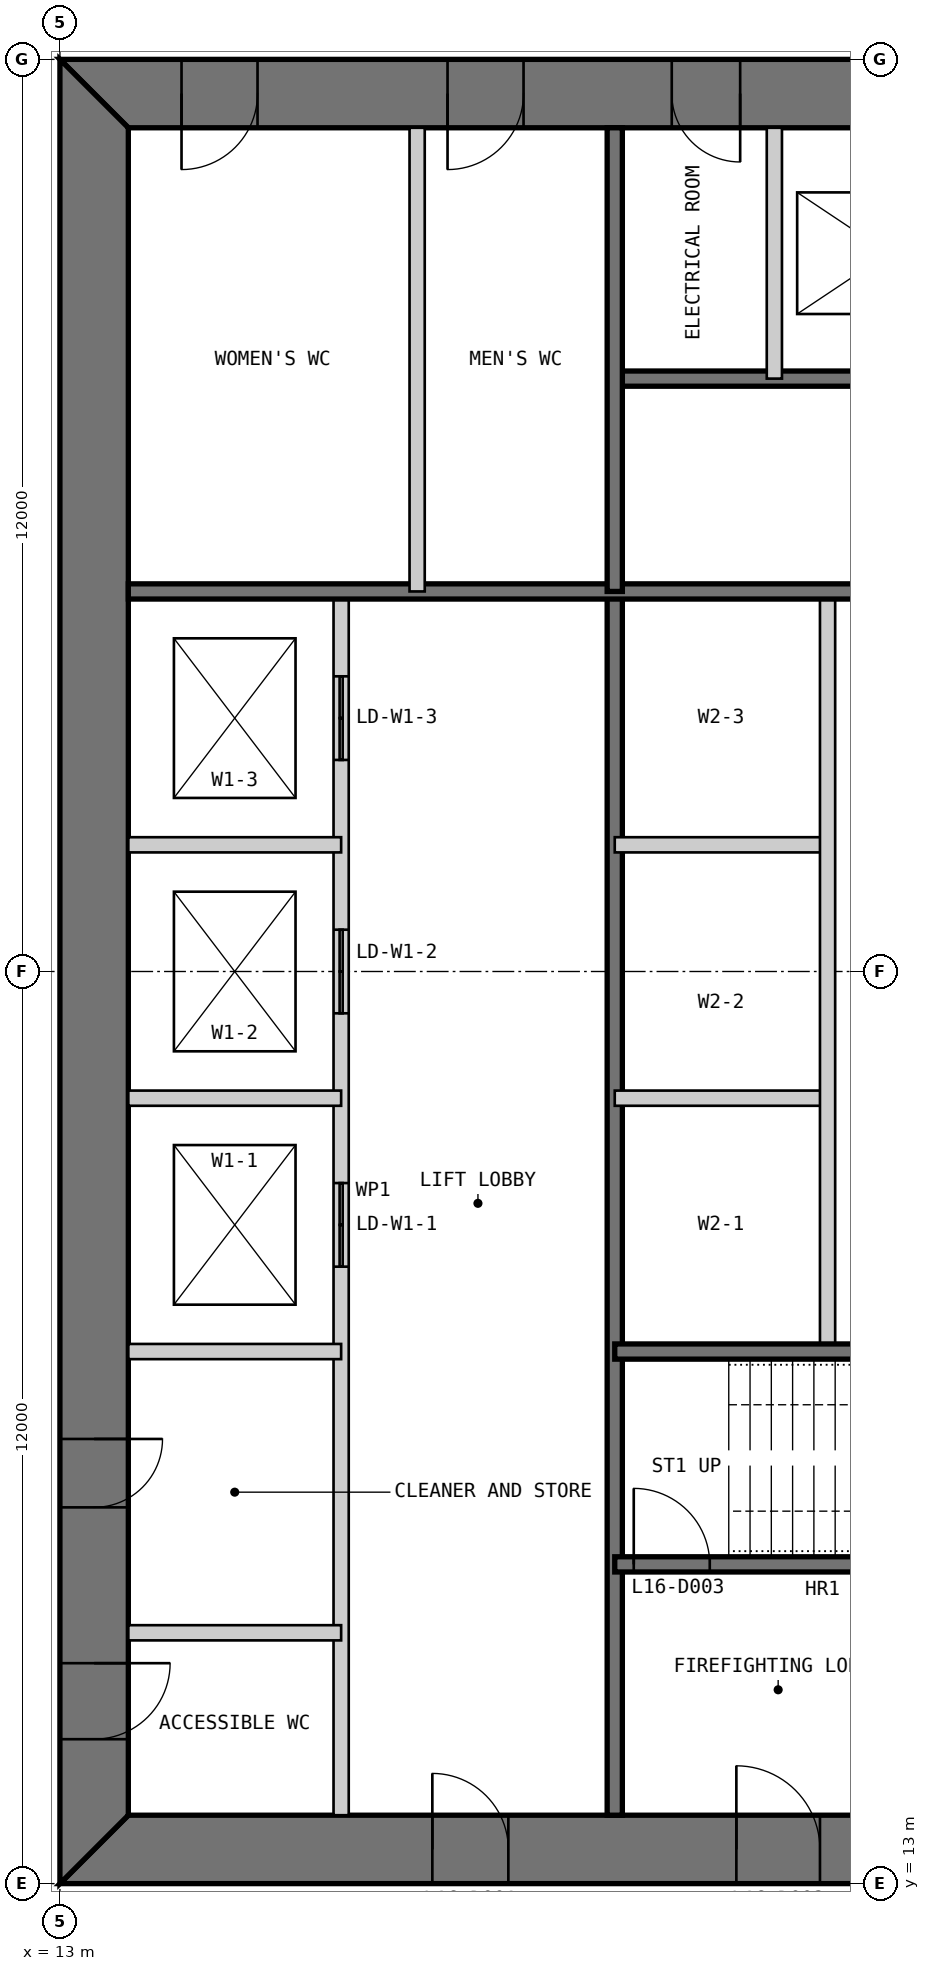
"""IFC4 building model, lengths in metres.
Left out: names, types, materials, properties, quantities, classifications, styles, units other than length and angle.
Written with IfcOpenShell. Run it as: python <this file> out.ifc"""

import sys

from ifc_helpers import new_model, si_unit, direction, frame, frame_2d, origin, place, context, subcontext, project, spatial, polyline, rectangle, outline, extrude, element, fill, save


model = new_model("IFC4")
c1 = context("Model", 3, precision=1e-05, world=origin(), true_north=direction((0.0, 1.0)))
c2 = subcontext(c1, "Body", "Model", "MODEL_VIEW")
j1 = project(units=[si_unit("LENGTHUNIT", "METRE"), si_unit("PLANEANGLEUNIT", "RADIAN")], contexts=[c1])
p1 = place(None, origin())
s1 = spatial("IfcSite", under=j1, at=p1, CompositionType="ELEMENT")
p2 = place(p1, origin())
s2 = spatial("IfcBuilding", under=s1, at=p2, CompositionType="ELEMENT")
p3 = place(p2, frame((0.0, 0.0, 71.0)))
s3 = spatial("IfcBuildingStorey", under=s2, at=p3, CompositionType="ELEMENT", Elevation=71.0)
p4 = place(p3, frame((13.0, 13.45, 0.0), z_axis=(0.0, 0.0, 1.0), x_axis=(1.0, 0.0, 0.0)))
e1 = element("IfcWall", 1, at=p4, inside=s3, PredefinedType="SHEAR", context=c2, shape_type="SweptSolid", body=[
    extrude(outline(polyline([(0.0, -0.45), (24.0, -0.45), (23.1, 0.45), (0.9, 0.45), (0.0, -0.45)])), origin(), (0.0, 0.0, 1.0), 4.0),
])
p5 = place(p4, frame((4.9, 0.0, 0.0)))
e2 = element("IfcOpeningElement", 2, at=p5, cuts=e1, PredefinedType="OPENING", context=c2, shape_type="SweptSolid", body=[
    extrude(rectangle(XDim=1.0, YDim=2.2, at=frame_2d((0.5, 1.1))), frame((0.0, 0.46, 0.0), z_axis=(0.0, -1.0, 0.0), x_axis=(1.0, 0.0, 0.0)), (0.0, 0.0, 1.0), 0.92),
])
p6 = place(p4, frame((8.9, 0.0, 0.0)))
e3 = element("IfcOpeningElement", 3, at=p6, cuts=e1, PredefinedType="OPENING", context=c2, shape_type="SweptSolid", body=[
    extrude(rectangle(XDim=1.1, YDim=2.2, at=frame_2d((0.55, 1.1))), frame((0.0, 0.46, 0.0), z_axis=(0.0, -1.0, 0.0), x_axis=(1.0, 0.0, 0.0)), (0.0, 0.0, 1.0), 0.92),
])
p7 = place(p4, frame((15.05, 0.0, 0.0)))
e4 = element("IfcOpeningElement", 4, at=p7, cuts=e1, PredefinedType="OPENING", context=c2, shape_type="SweptSolid", body=[
    extrude(rectangle(XDim=0.9, YDim=2.2, at=frame_2d((0.45, 1.1))), frame((0.0, 0.46, 0.0), z_axis=(0.0, -1.0, 0.0), x_axis=(1.0, 0.0, 0.0)), (0.0, 0.0, 1.0), 0.92),
])
p8 = place(p4, frame((17.9, 0.0, 0.0)))
e5 = element("IfcOpeningElement", 5, at=p8, cuts=e1, PredefinedType="OPENING", context=c2, shape_type="SweptSolid", body=[
    extrude(rectangle(XDim=1.0, YDim=2.2, at=frame_2d((0.5, 1.1))), frame((0.0, 0.46, 0.0), z_axis=(0.0, -1.0, 0.0), x_axis=(1.0, 0.0, 0.0)), (0.0, 0.0, 1.0), 0.92),
])
p9 = place(p4, frame((21.4, 0.0, 0.0)))
e6 = element("IfcOpeningElement", 6, at=p9, cuts=e1, PredefinedType="OPENING", context=c2, shape_type="SweptSolid", body=[
    extrude(rectangle(XDim=1.0, YDim=2.2, at=frame_2d((0.5, 1.1))), frame((0.0, 0.46, 0.0), z_axis=(0.0, -1.0, 0.0), x_axis=(1.0, 0.0, 0.0)), (0.0, 0.0, 1.0), 0.92),
])
p10 = place(p3, frame((37.0, 36.55, 0.0), z_axis=(0.0, 0.0, 1.0), x_axis=(-1.0, 0.0, 0.0)))
e7 = element("IfcWall", 7, at=p10, inside=s3, PredefinedType="SHEAR", context=c2, shape_type="SweptSolid", body=[
    extrude(outline(polyline([(0.0, -0.45), (24.0, -0.45), (23.1, 0.45), (0.9, 0.45), (0.0, -0.45)])), origin(), (0.0, 0.0, 1.0), 4.0),
])
p11 = place(p10, frame((4.9, 0.0, 0.0)))
e8 = element("IfcOpeningElement", 8, at=p11, cuts=e7, PredefinedType="OPENING", context=c2, shape_type="SweptSolid", body=[
    extrude(rectangle(XDim=1.0, YDim=2.2, at=frame_2d((0.5, 1.1))), frame((0.0, 0.46, 0.0), z_axis=(0.0, -1.0, 0.0), x_axis=(1.0, 0.0, 0.0)), (0.0, 0.0, 1.0), 0.92),
])
p12 = place(p10, frame((8.9, 0.0, 0.0)))
e9 = element("IfcOpeningElement", 9, at=p12, cuts=e7, PredefinedType="OPENING", context=c2, shape_type="SweptSolid", body=[
    extrude(rectangle(XDim=1.1, YDim=2.2, at=frame_2d((0.55, 1.1))), frame((0.0, 0.46, 0.0), z_axis=(0.0, -1.0, 0.0), x_axis=(1.0, 0.0, 0.0)), (0.0, 0.0, 1.0), 0.92),
])
p13 = place(p10, frame((15.05, 0.0, 0.0)))
e10 = element("IfcOpeningElement", 10, at=p13, cuts=e7, PredefinedType="OPENING", context=c2, shape_type="SweptSolid", body=[
    extrude(rectangle(XDim=0.9, YDim=2.2, at=frame_2d((0.45, 1.1))), frame((0.0, 0.46, 0.0), z_axis=(0.0, -1.0, 0.0), x_axis=(1.0, 0.0, 0.0)), (0.0, 0.0, 1.0), 0.92),
])
p14 = place(p10, frame((17.9, 0.0, 0.0)))
e11 = element("IfcOpeningElement", 11, at=p14, cuts=e7, PredefinedType="OPENING", context=c2, shape_type="SweptSolid", body=[
    extrude(rectangle(XDim=1.0, YDim=2.2, at=frame_2d((0.5, 1.1))), frame((0.0, 0.46, 0.0), z_axis=(0.0, -1.0, 0.0), x_axis=(1.0, 0.0, 0.0)), (0.0, 0.0, 1.0), 0.92),
])
p15 = place(p10, frame((21.4, 0.0, 0.0)))
e12 = element("IfcOpeningElement", 12, at=p15, cuts=e7, PredefinedType="OPENING", context=c2, shape_type="SweptSolid", body=[
    extrude(rectangle(XDim=1.0, YDim=2.2, at=frame_2d((0.5, 1.1))), frame((0.0, 0.46, 0.0), z_axis=(0.0, -1.0, 0.0), x_axis=(1.0, 0.0, 0.0)), (0.0, 0.0, 1.0), 0.92),
])
p16 = place(p3, frame((13.45, 36.1, 0.0), z_axis=(0.0, 0.0, 1.0), x_axis=(0.0, -1.0, 0.0)))
e13 = element("IfcWall", 13, at=p16, inside=s3, PredefinedType="SHEAR", context=c2, shape_type="SweptSolid", body=[
    extrude(outline(polyline([(-0.9, -0.45), (23.1, -0.45), (22.2, 0.45), (0.0, 0.45), (-0.9, -0.45)])), origin(), (0.0, 0.0, 1.0), 4.0),
])
p17 = place(p16, frame((20.2, 0.0, 0.0)))
e14 = element("IfcOpeningElement", 14, at=p17, cuts=e13, PredefinedType="OPENING", context=c2, shape_type="SweptSolid", body=[
    extrude(rectangle(XDim=1.0, YDim=2.2, at=frame_2d((0.5, 1.1))), frame((0.0, 0.46, 0.0), z_axis=(0.0, -1.0, 0.0), x_axis=(1.0, 0.0, 0.0)), (0.0, 0.0, 1.0), 0.92),
])
p18 = place(p16, frame((17.25, 0.0, 0.0)))
e15 = element("IfcOpeningElement", 15, at=p18, cuts=e13, PredefinedType="OPENING", context=c2, shape_type="SweptSolid", body=[
    extrude(rectangle(XDim=0.9, YDim=2.2, at=frame_2d((0.45, 1.1))), frame((0.0, 0.46, 0.0), z_axis=(0.0, -1.0, 0.0), x_axis=(1.0, 0.0, 0.0)), (0.0, 0.0, 1.0), 0.92),
])
p19 = place(p3, frame((16.7, 13.9, 0.0), z_axis=(0.0, 0.0, 1.0), x_axis=(0.0, 1.0, 0.0)))
e16 = element("IfcWall", 16, at=p19, inside=s3, PredefinedType="PARTITIONING", context=c2, shape_type="SweptSolid", body=[
    extrude(rectangle(XDim=16.1, YDim=0.2, at=frame_2d((8.05, 0.0))), origin(), (0.0, 0.0, 1.0), 3.8),
])
p20 = place(p19, frame((7.217, 0.0, 0.0)))
e17 = element("IfcOpeningElement", 17, at=p20, cuts=e16, PredefinedType="OPENING", context=c2, shape_type="SweptSolid", body=[
    extrude(rectangle(XDim=1.1, YDim=2.2, at=frame_2d((0.55, 1.1))), frame((0.0, 0.11, 0.0), z_axis=(0.0, -1.0, 0.0), x_axis=(1.0, 0.0, 0.0)), (0.0, 0.0, 1.0), 0.22),
])
p21 = place(p19, frame((10.55, 0.0, 0.0)))
e18 = element("IfcOpeningElement", 18, at=p21, cuts=e16, PredefinedType="OPENING", context=c2, shape_type="SweptSolid", body=[
    extrude(rectangle(XDim=1.1, YDim=2.2, at=frame_2d((0.55, 1.1))), frame((0.0, 0.11, 0.0), z_axis=(0.0, -1.0, 0.0), x_axis=(1.0, 0.0, 0.0)), (0.0, 0.0, 1.0), 0.22),
])
p22 = place(p19, frame((13.883, 0.0, 0.0)))
e19 = element("IfcOpeningElement", 19, at=p22, cuts=e16, PredefinedType="OPENING", context=c2, shape_type="SweptSolid", body=[
    extrude(rectangle(XDim=1.1, YDim=2.2, at=frame_2d((0.55, 1.1))), frame((0.0, 0.11, 0.0), z_axis=(0.0, -1.0, 0.0), x_axis=(1.0, 0.0, 0.0)), (0.0, 0.0, 1.0), 0.22),
])
p23 = place(p3, frame((20.3, 13.9, 0.0), z_axis=(0.0, 0.0, 1.0), x_axis=(0.0, 1.0, 0.0)))
e20 = element("IfcWall", 20, at=p23, inside=s3, PredefinedType="SOLIDWALL", context=c2, shape_type="SweptSolid", body=[
    extrude(rectangle(XDim=16.1, YDim=0.2, at=frame_2d((8.05, 0.0))), origin(), (0.0, 0.0, 1.0), 3.8),
])
for number, where, z_axis, x_axis in (
    (21, (13.9, 20.0, 0.0), (0.0, 0.0, 1.0), (1.0, 0.0, 0.0)),
    (22, (13.9, 23.333, 0.0), (0.0, 0.0, 1.0), (1.0, 0.0, 0.0)),
    (23, (13.9, 26.667, 0.0), (0.0, 0.0, 1.0), (1.0, 0.0, 0.0)),
    (24, (20.3, 23.333, 0.0), (0.0, 0.0, 1.0), (1.0, 0.0, 0.0)),
    (25, (20.3, 26.667, 0.0), (0.0, 0.0, 1.0), (1.0, 0.0, 0.0)),
):
    element("IfcWall", number, at=place(p3, frame(where, z_axis=z_axis, x_axis=x_axis)), inside=s3, PredefinedType="PARTITIONING", context=c2, shape_type="SweptSolid", body=[
        extrude(rectangle(XDim=2.8, YDim=0.2, at=frame_2d((1.4, 0.0))), origin(), (0.0, 0.0, 1.0), 3.8),
    ])
p24 = place(p3, frame((23.1, 20.0, 0.0), z_axis=(0.0, 0.0, 1.0), x_axis=(0.0, 1.0, 0.0)))
e26 = element("IfcWall", 26, at=p24, inside=s3, PredefinedType="PARTITIONING", context=c2, shape_type="SweptSolid", body=[
    extrude(rectangle(XDim=10.0, YDim=0.2, at=frame_2d((5.0, 0.0))), origin(), (0.0, 0.0, 1.0), 3.8),
])
p25 = place(p3, frame((20.3, 17.2, 0.0), z_axis=(0.0, 0.0, 1.0), x_axis=(1.0, 0.0, 0.0)))
e27 = element("IfcWall", 27, at=p25, inside=s3, PredefinedType="SOLIDWALL", context=c2, shape_type="SweptSolid", body=[
    extrude(rectangle(XDim=9.4, YDim=0.2, at=frame_2d((4.7, 0.0))), origin(), (0.0, 0.0, 1.0), 3.8),
])
p26 = place(p25, frame((0.25, 0.0, 0.0)))
e28 = element("IfcOpeningElement", 28, at=p26, cuts=e27, PredefinedType="OPENING", context=c2, shape_type="SweptSolid", body=[
    extrude(rectangle(XDim=1.0, YDim=2.2, at=frame_2d((0.5, 1.1))), frame((0.0, 0.11, 0.0), z_axis=(0.0, -1.0, 0.0), x_axis=(1.0, 0.0, 0.0)), (0.0, 0.0, 1.0), 0.22),
])
p27 = place(p3, frame((20.3, 20.0, 0.0), z_axis=(0.0, 0.0, 1.0), x_axis=(1.0, 0.0, 0.0)))
e29 = element("IfcWall", 29, at=p27, inside=s3, PredefinedType="SOLIDWALL", context=c2, shape_type="SweptSolid", body=[
    extrude(rectangle(XDim=15.8, YDim=0.2, at=frame_2d((7.9, 0.0))), origin(), (0.0, 0.0, 1.0), 3.8),
])
p28 = place(p3, frame((13.9, 16.3, 0.0), z_axis=(0.0, 0.0, 1.0), x_axis=(1.0, 0.0, 0.0)))
e30 = element("IfcWall", 30, at=p28, inside=s3, PredefinedType="PARTITIONING", context=c2, shape_type="SweptSolid", body=[
    extrude(rectangle(XDim=2.8, YDim=0.2, at=frame_2d((1.4, 0.0))), origin(), (0.0, 0.0, 1.0), 3.8),
])
p29 = place(p3, frame((29.7, 32.8, 0.0), z_axis=(0.0, 0.0, 1.0), x_axis=(-1.0, 0.0, 0.0)))
e31 = element("IfcWall", 31, at=p29, inside=s3, PredefinedType="SOLIDWALL", context=c2, shape_type="SweptSolid", body=[
    extrude(rectangle(XDim=9.4, YDim=0.2, at=frame_2d((4.7, 0.0))), origin(), (0.0, 0.0, 1.0), 3.8),
])
p30 = place(p29, frame((0.25, 0.0, 0.0)))
e32 = element("IfcOpeningElement", 32, at=p30, cuts=e31, PredefinedType="OPENING", context=c2, shape_type="SweptSolid", body=[
    extrude(rectangle(XDim=1.0, YDim=2.2, at=frame_2d((0.5, 1.1))), frame((0.0, 0.11, 0.0), z_axis=(0.0, -1.0, 0.0), x_axis=(1.0, 0.0, 0.0)), (0.0, 0.0, 1.0), 0.22),
])
p31 = place(p3, frame((29.7, 30.0, 0.0), z_axis=(0.0, 0.0, 1.0), x_axis=(-1.0, 0.0, 0.0)))
e33 = element("IfcWall", 33, at=p31, inside=s3, PredefinedType="SOLIDWALL", context=c2, shape_type="SweptSolid", body=[
    extrude(rectangle(XDim=15.8, YDim=0.2, at=frame_2d((7.9, 0.0))), origin(), (0.0, 0.0, 1.0), 3.8),
])
p32 = place(p3, frame((22.4, 36.1, 0.0), z_axis=(0.0, 0.0, 1.0), x_axis=(0.0, -1.0, 0.0)))
e34 = element("IfcWall", 34, at=p32, inside=s3, PredefinedType="PARTITIONING", context=c2, shape_type="SweptSolid", body=[
    extrude(rectangle(XDim=3.3, YDim=0.2, at=frame_2d((1.65, 0.0))), origin(), (0.0, 0.0, 1.0), 3.8),
])
p33 = place(p3, frame((20.3, 36.1, 0.0), z_axis=(0.0, 0.0, 1.0), x_axis=(0.0, -1.0, 0.0)))
e35 = element("IfcWall", 35, at=p33, inside=s3, PredefinedType="SOLIDWALL", context=c2, shape_type="SweptSolid", body=[
    extrude(rectangle(XDim=6.1, YDim=0.2, at=frame_2d((3.05, 0.0))), origin(), (0.0, 0.0, 1.0), 3.8),
])
p34 = place(p3, frame((17.7, 36.1, 0.0), z_axis=(0.0, 0.0, 1.0), x_axis=(0.0, -1.0, 0.0)))
e36 = element("IfcWall", 36, at=p34, inside=s3, PredefinedType="PARTITIONING", context=c2, shape_type="SweptSolid", body=[
    extrude(rectangle(XDim=6.1, YDim=0.2, at=frame_2d((3.05, 0.0))), origin(), (0.0, 0.0, 1.0), 3.8),
])
p35 = place(p5, origin())
e37 = element("IfcDoor", 37, at=p35, inside=s3, OperationType="SINGLE_SWING_LEFT", PredefinedType="DOOR", context=c2, shape_type="SweptSolid", body=[
    extrude(rectangle(XDim=1.0, YDim=2.2, at=frame_2d((0.5, 1.1))), frame((0.0, 0.025, 0.0), z_axis=(0.0, -1.0, 0.0), x_axis=(1.0, 0.0, 0.0)), (0.0, 0.0, 1.0), 0.05),
    extrude(outline(polyline([(0.0, 0.0), (0.04, 0.0), (0.04, 2.16), (0.96, 2.16), (0.96, 0.0), (1.0, 0.0), (1.0, 2.2), (0.0, 2.2), (0.0, 0.0)])), frame((0.0, 0.3, 0.0), z_axis=(0.0, -1.0, 0.0), x_axis=(1.0, 0.0, 0.0)), (0.0, 0.0, 1.0), 0.6),
])
fill(e2, e37)
p36 = place(p6, origin())
e38 = element("IfcDoor", 38, at=p36, inside=s3, OperationType="SINGLE_SWING_LEFT", PredefinedType="DOOR", context=c2, shape_type="SweptSolid", body=[
    extrude(rectangle(XDim=1.1, YDim=2.2, at=frame_2d((0.55, 1.1))), frame((0.0, 0.025, 0.0), z_axis=(0.0, -1.0, 0.0), x_axis=(1.0, 0.0, 0.0)), (0.0, 0.0, 1.0), 0.05),
    extrude(outline(polyline([(0.0, 0.0), (0.04, 0.0), (0.04, 2.16), (1.06, 2.16), (1.06, 0.0), (1.1, 0.0), (1.1, 2.2), (0.0, 2.2), (0.0, 0.0)])), frame((0.0, 0.3, 0.0), z_axis=(0.0, -1.0, 0.0), x_axis=(1.0, 0.0, 0.0)), (0.0, 0.0, 1.0), 0.6),
])
fill(e3, e38)
p37 = place(p26, origin())
e39 = element("IfcDoor", 39, at=p37, inside=s3, OperationType="SINGLE_SWING_LEFT", PredefinedType="DOOR", context=c2, shape_type="SweptSolid", body=[
    extrude(rectangle(XDim=1.0, YDim=2.2, at=frame_2d((0.5, 1.1))), frame((0.0, 0.025, 0.0), z_axis=(0.0, -1.0, 0.0), x_axis=(1.0, 0.0, 0.0)), (0.0, 0.0, 1.0), 0.05),
])
fill(e28, e39)
p38 = place(p17, origin())
e40 = element("IfcDoor", 40, at=p38, inside=s3, OperationType="SINGLE_SWING_LEFT", PredefinedType="DOOR", context=c2, shape_type="SweptSolid", body=[
    extrude(rectangle(XDim=1.0, YDim=2.2, at=frame_2d((0.5, 1.1))), frame((0.0, 0.025, 0.0), z_axis=(0.0, -1.0, 0.0), x_axis=(1.0, 0.0, 0.0)), (0.0, 0.0, 1.0), 0.05),
    extrude(outline(polyline([(0.0, 0.0), (0.04, 0.0), (0.04, 2.16), (0.96, 2.16), (0.96, 0.0), (1.0, 0.0), (1.0, 2.2), (0.0, 2.2), (0.0, 0.0)])), frame((0.0, 0.3, 0.0), z_axis=(0.0, -1.0, 0.0), x_axis=(1.0, 0.0, 0.0)), (0.0, 0.0, 1.0), 0.6),
])
fill(e14, e40)
p39 = place(p18, origin())
e41 = element("IfcDoor", 41, at=p39, inside=s3, OperationType="SINGLE_SWING_LEFT", PredefinedType="DOOR", context=c2, shape_type="SweptSolid", body=[
    extrude(rectangle(XDim=0.9, YDim=2.2, at=frame_2d((0.45, 1.1))), frame((0.0, 0.025, 0.0), z_axis=(0.0, -1.0, 0.0), x_axis=(1.0, 0.0, 0.0)), (0.0, 0.0, 1.0), 0.05),
    extrude(outline(polyline([(0.0, 0.0), (0.04, 0.0), (0.04, 2.16), (0.86, 2.16), (0.86, 0.0), (0.9, 0.0), (0.9, 2.2), (0.0, 2.2), (0.0, 0.0)])), frame((0.0, 0.3, 0.0), z_axis=(0.0, -1.0, 0.0), x_axis=(1.0, 0.0, 0.0)), (0.0, 0.0, 1.0), 0.6),
])
fill(e15, e41)
p40 = place(p13, origin())
e42 = element("IfcDoor", 42, at=p40, inside=s3, OperationType="SINGLE_SWING_LEFT", PredefinedType="DOOR", context=c2, shape_type="SweptSolid", body=[
    extrude(rectangle(XDim=0.9, YDim=2.2, at=frame_2d((0.45, 1.1))), frame((0.0, 0.025, 0.0), z_axis=(0.0, -1.0, 0.0), x_axis=(1.0, 0.0, 0.0)), (0.0, 0.0, 1.0), 0.05),
    extrude(outline(polyline([(0.0, 0.0), (0.04, 0.0), (0.04, 2.16), (0.86, 2.16), (0.86, 0.0), (0.9, 0.0), (0.9, 2.2), (0.0, 2.2), (0.0, 0.0)])), frame((0.0, 0.3, 0.0), z_axis=(0.0, -1.0, 0.0), x_axis=(1.0, 0.0, 0.0)), (0.0, 0.0, 1.0), 0.6),
])
fill(e10, e42)
p41 = place(p14, origin())
e43 = element("IfcDoor", 43, at=p41, inside=s3, OperationType="SINGLE_SWING_RIGHT", PredefinedType="DOOR", context=c2, shape_type="SweptSolid", body=[
    extrude(rectangle(XDim=1.0, YDim=2.2, at=frame_2d((0.5, 1.1))), frame((0.0, 0.025, 0.0), z_axis=(0.0, -1.0, 0.0), x_axis=(1.0, 0.0, 0.0)), (0.0, 0.0, 1.0), 0.05),
    extrude(outline(polyline([(0.0, 0.0), (0.04, 0.0), (0.04, 2.16), (0.96, 2.16), (0.96, 0.0), (1.0, 0.0), (1.0, 2.2), (0.0, 2.2), (0.0, 0.0)])), frame((0.0, 0.3, 0.0), z_axis=(0.0, -1.0, 0.0), x_axis=(1.0, 0.0, 0.0)), (0.0, 0.0, 1.0), 0.6),
])
fill(e11, e43)
p42 = place(p15, origin())
e44 = element("IfcDoor", 44, at=p42, inside=s3, OperationType="SINGLE_SWING_RIGHT", PredefinedType="DOOR", context=c2, shape_type="SweptSolid", body=[
    extrude(rectangle(XDim=1.0, YDim=2.2, at=frame_2d((0.5, 1.1))), frame((0.0, 0.025, 0.0), z_axis=(0.0, -1.0, 0.0), x_axis=(1.0, 0.0, 0.0)), (0.0, 0.0, 1.0), 0.05),
    extrude(outline(polyline([(0.0, 0.0), (0.04, 0.0), (0.04, 2.16), (0.96, 2.16), (0.96, 0.0), (1.0, 0.0), (1.0, 2.2), (0.0, 2.2), (0.0, 0.0)])), frame((0.0, 0.3, 0.0), z_axis=(0.0, -1.0, 0.0), x_axis=(1.0, 0.0, 0.0)), (0.0, 0.0, 1.0), 0.6),
])
fill(e12, e44)
p43 = place(p20, origin())
e45 = element("IfcDoor", 45, at=p43, inside=s3, OperationType="DOUBLE_DOOR_SLIDING", PredefinedType="DOOR", context=c2, shape_type="SweptSolid", body=[
    extrude(rectangle(XDim=1.1, YDim=2.2, at=frame_2d((0.55, 1.1))), frame((0.0, 0.025, 0.0), z_axis=(0.0, -1.0, 0.0), x_axis=(1.0, 0.0, 0.0)), (0.0, 0.0, 1.0), 0.05),
])
fill(e17, e45)
p44 = place(p21, origin())
e46 = element("IfcDoor", 46, at=p44, inside=s3, OperationType="DOUBLE_DOOR_SLIDING", PredefinedType="DOOR", context=c2, shape_type="SweptSolid", body=[
    extrude(rectangle(XDim=1.1, YDim=2.2, at=frame_2d((0.55, 1.1))), frame((0.0, 0.025, 0.0), z_axis=(0.0, -1.0, 0.0), x_axis=(1.0, 0.0, 0.0)), (0.0, 0.0, 1.0), 0.05),
])
fill(e18, e46)
p45 = place(p22, origin())
e47 = element("IfcDoor", 47, at=p45, inside=s3, OperationType="DOUBLE_DOOR_SLIDING", PredefinedType="DOOR", context=c2, shape_type="SweptSolid", body=[
    extrude(rectangle(XDim=1.1, YDim=2.2, at=frame_2d((0.55, 1.1))), frame((0.0, 0.025, 0.0), z_axis=(0.0, -1.0, 0.0), x_axis=(1.0, 0.0, 0.0)), (0.0, 0.0, 1.0), 0.05),
])
fill(e19, e47)
save(model, sys.argv[1])
